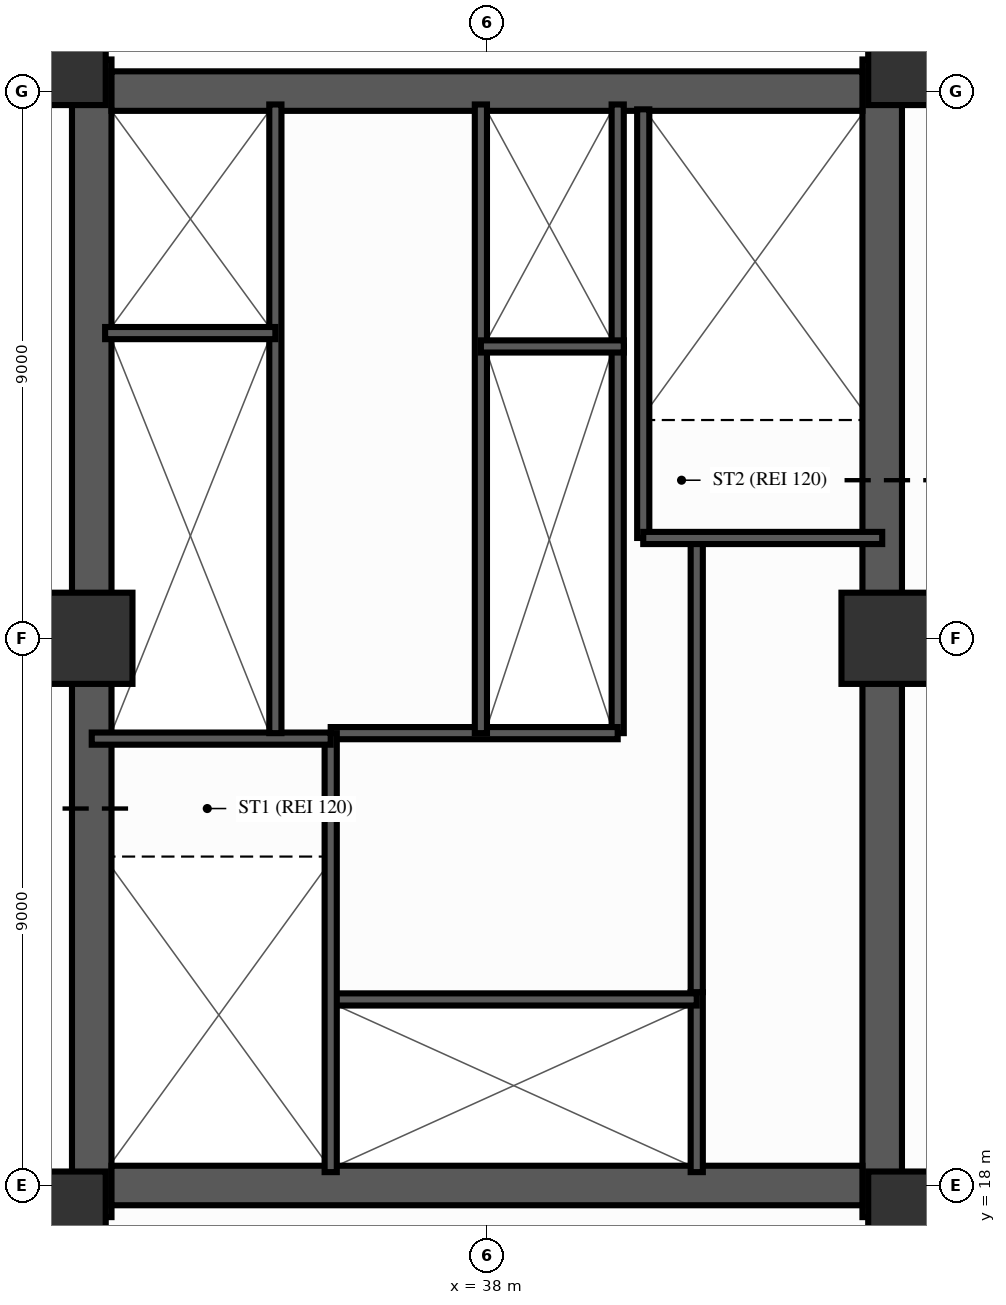
"""IFC4 building model, lengths in metres.
Left out: names, types, materials, properties, quantities, classifications, styles, units other than length and angle.
Written with IfcOpenShell. Run it as: python <this file> out.ifc"""

import sys

from ifc_helpers import new_model, si_unit, direction, frame, frame_2d, origin, origin_2d, place, context, subcontext, project, spatial, rectangle, extrude, source, transform, mapped, element, fill, save


model = new_model("IFC4")
c1 = context("Model", 3, precision=1e-05, world=origin(), true_north=direction((0.0, 1.0)))
c2 = subcontext(c1, "Body", "Model", "MODEL_VIEW")
j1 = project(units=[si_unit("LENGTHUNIT", "METRE"), si_unit("PLANEANGLEUNIT", "RADIAN")], contexts=[c1])
p1 = place(None, origin())
s1 = spatial("IfcSite", under=j1, at=p1, CompositionType="ELEMENT")
p2 = place(p1, origin())
s2 = spatial("IfcBuilding", under=s1, at=p2, CompositionType="ELEMENT")
p3 = place(p2, frame((0.0, 0.0, 19.4)))
s3 = spatial("IfcBuildingStorey", under=s2, at=p3, CompositionType="ELEMENT", Elevation=19.4)
p4 = place(p3, frame((31.5, 17.48, 0.0), z_axis=(0.0, 0.0, 1.0), x_axis=(0.0, 1.0, 0.0)))
e1 = element("IfcWall", 1, at=p4, inside=s3, PredefinedType="SHEAR", context=c2, shape_type="SweptSolid", body=[
    extrude(rectangle(XDim=19.04, YDim=0.65, at=frame_2d((9.52, 0.0))), origin(), (0.0, 0.0, 1.0), 3.0),
])
p5 = place(p4, frame((6.32, 0.0, 0.0)))
e2 = element("IfcOpeningElement", 2, at=p5, cuts=e1, PredefinedType="OPENING", context=c2, shape_type="SweptSolid", body=[
    extrude(rectangle(XDim=1.1, YDim=2.15, at=frame_2d((0.55, 1.075))), frame((0.0, 0.337, 0.0), z_axis=(0.0, -1.0, 0.0), x_axis=(1.0, 0.0, 0.0)), (0.0, 0.0, 1.0), 0.674),
])
p6 = place(p3, frame((44.5, 17.48, 0.0), z_axis=(0.0, 0.0, 1.0), x_axis=(0.0, 1.0, 0.0)))
e3 = element("IfcWall", 3, at=p6, inside=s3, PredefinedType="SHEAR", context=c2, shape_type="SweptSolid", body=[
    extrude(rectangle(XDim=19.04, YDim=0.65, at=frame_2d((9.52, 0.0))), origin(), (0.0, 0.0, 1.0), 3.0),
])
p7 = place(p6, frame((12.67, 0.0, 0.0), z_axis=(0.0, 0.0, 1.0), x_axis=(-1.0, 0.0, 0.0)))
e4 = element("IfcOpeningElement", 4, at=p7, cuts=e3, PredefinedType="OPENING", context=c2, shape_type="SweptSolid", body=[
    extrude(rectangle(XDim=1.1, YDim=2.15, at=frame_2d((0.55, 1.075))), frame((0.0, 0.337, 0.0), z_axis=(0.0, -1.0, 0.0), x_axis=(1.0, 0.0, 0.0)), (0.0, 0.0, 1.0), 0.674),
])
p8 = place(p3, frame((31.825, 18.0, 0.0), z_axis=(0.0, 0.0, 1.0), x_axis=(1.0, 0.0, 0.0)))
e5 = element("IfcWall", 5, at=p8, inside=s3, PredefinedType="SHEAR", context=c2, shape_type="SweptSolid", body=[
    extrude(rectangle(XDim=12.35, YDim=0.65, at=frame_2d((6.175, 0.0))), origin(), (0.0, 0.0, 1.0), 3.0),
])
p9 = place(p3, frame((31.825, 36.0, 0.0), z_axis=(0.0, 0.0, 1.0), x_axis=(1.0, 0.0, 0.0)))
e6 = element("IfcWall", 6, at=p9, inside=s3, PredefinedType="SHEAR", context=c2, shape_type="SweptSolid", body=[
    extrude(rectangle(XDim=12.35, YDim=0.65, at=frame_2d((6.175, 0.0))), origin(), (0.0, 0.0, 1.0), 3.0),
])
p10 = place(p9, frame((5.125, 0.0, 0.0), z_axis=(0.0, 0.0, 1.0), x_axis=(-1.0, 0.0, 0.0)))
e7 = element("IfcOpeningElement", 7, at=p10, cuts=e6, PredefinedType="OPENING", context=c2, shape_type="SweptSolid", body=[
    extrude(rectangle(XDim=1.4, YDim=2.15, at=frame_2d((0.7, 1.075))), frame((0.0, 0.337, 0.0), z_axis=(0.0, -1.0, 0.0), x_axis=(1.0, 0.0, 0.0)), (0.0, 0.0, 1.0), 0.674),
])
m1 = source(origin(), c2, "Body", "SweptSolid", [
    extrude(rectangle(XDim=1.5, YDim=1.5, at=origin_2d()), origin(), (0.0, 0.0, 1.0), 3.0),
])
for number, where, z_axis, x_axis in (
    (8, (30.98, 17.48, 0.0), (0.0, 0.0, 1.0), (1.0, 0.0, 0.0)),
    (9, (45.02, 17.48, 0.0), (0.0, 0.0, 1.0), (1.0, 0.0, 0.0)),
    (10, (30.98, 36.52, 0.0), (0.0, 0.0, 1.0), (1.0, 0.0, 0.0)),
    (11, (45.02, 36.52, 0.0), (0.0, 0.0, 1.0), (1.0, 0.0, 0.0)),
    (12, (31.42, 27.0, 0.0), (0.0, 0.0, 1.0), (1.0, 0.0, 0.0)),
    (13, (44.58, 27.0, 0.0), (0.0, 0.0, 1.0), (1.0, 0.0, 0.0)),
):
    element("IfcColumn", number, at=place(p3, frame(where, z_axis=z_axis, x_axis=x_axis)), inside=s3, PredefinedType="COLUMN", context=c2, shape_type="MappedRepresentation", body=[
        mapped(m1, transform((0.0, 0.0, 0.0), scale=1.0)),
    ])
p11 = place(p3, frame((41.45, 18.22, 0.0), z_axis=(0.0, 0.0, 1.0), x_axis=(0.0, 1.0, 0.0)))
e14 = element("IfcWall", 14, at=p11, inside=s3, PredefinedType="PARTITIONING", context=c2, shape_type="SweptSolid", body=[
    extrude(rectangle(XDim=2.96, YDim=0.2, at=frame_2d((1.48, 0.0))), origin(), (0.0, 0.0, 1.0), 2.79),
])
p12 = place(p3, frame((41.45, 21.18, 0.0), z_axis=(0.0, 0.0, 1.0), x_axis=(0.0, 1.0, 0.0)))
e15 = element("IfcWall", 15, at=p12, inside=s3, PredefinedType="PARTITIONING", context=c2, shape_type="SweptSolid", body=[
    extrude(rectangle(XDim=7.42, YDim=0.2, at=frame_2d((3.71, 0.0))), origin(), (0.0, 0.0, 1.0), 2.79),
])
p13 = place(p12, frame((2.6, 0.0, 0.0)))
e16 = element("IfcOpeningElement", 16, at=p13, cuts=e15, PredefinedType="OPENING", context=c2, shape_type="SweptSolid", body=[
    extrude(rectangle(XDim=0.9, YDim=2.1, at=frame_2d((0.45, 1.05))), frame((0.0, 0.112, 0.0), z_axis=(0.0, -1.0, 0.0), x_axis=(1.0, 0.0, 0.0)), (0.0, 0.0, 1.0), 0.224),
])
p14 = place(p3, frame((40.15, 25.44, 0.0), z_axis=(0.0, 0.0, 1.0), x_axis=(0.0, 1.0, 0.0)))
e17 = element("IfcWall", 17, at=p14, inside=s3, PredefinedType="PARTITIONING", context=c2, shape_type="SweptSolid", body=[
    extrude(rectangle(XDim=6.36, YDim=0.2, at=frame_2d((3.18, 0.0))), origin(), (0.0, 0.0, 1.0), 2.79),
])
p15 = place(p3, frame((40.15, 31.8, 0.0), z_axis=(0.0, 0.0, 1.0), x_axis=(0.0, 1.0, 0.0)))
e18 = element("IfcWall", 18, at=p15, inside=s3, PredefinedType="PARTITIONING", context=c2, shape_type="SweptSolid", body=[
    extrude(rectangle(XDim=3.98, YDim=0.2, at=frame_2d((1.99, 0.0))), origin(), (0.0, 0.0, 1.0), 2.79),
])
p16 = place(p3, frame((35.43, 21.06, 0.0), z_axis=(0.0, 0.0, 1.0), x_axis=(1.0, 0.0, 0.0)))
e19 = element("IfcWall", 19, at=p16, inside=s3, PredefinedType="PARTITIONING", context=c2, shape_type="SweptSolid", body=[
    extrude(rectangle(XDim=6.02, YDim=0.2, at=frame_2d((3.01, 0.0))), origin(), (0.0, 0.0, 1.0), 2.79),
])
p17 = place(p16, frame((1.0, 0.0, 0.0)))
e20 = element("IfcOpeningElement", 20, at=p17, cuts=e19, PredefinedType="OPENING", context=c2, shape_type="SweptSolid", body=[
    extrude(rectangle(XDim=1.1, YDim=2.15, at=frame_2d((0.55, 1.075))), frame((0.0, 0.112, 0.0), z_axis=(0.0, -1.0, 0.0), x_axis=(1.0, 0.0, 0.0)), (0.0, 0.0, 1.0), 0.224),
])
p18 = place(p16, frame((2.95, 0.0, 0.0)))
e21 = element("IfcOpeningElement", 21, at=p18, cuts=e19, PredefinedType="OPENING", context=c2, shape_type="SweptSolid", body=[
    extrude(rectangle(XDim=1.1, YDim=2.15, at=frame_2d((0.55, 1.075))), frame((0.0, 0.112, 0.0), z_axis=(0.0, -1.0, 0.0), x_axis=(1.0, 0.0, 0.0)), (0.0, 0.0, 1.0), 0.224),
])
p19 = place(p16, frame((4.58, 0.0, 0.0)))
e22 = element("IfcOpeningElement", 22, at=p19, cuts=e19, PredefinedType="OPENING", context=c2, shape_type="SweptSolid", body=[
    extrude(rectangle(XDim=1.2, YDim=2.15, at=frame_2d((0.6, 1.075))), frame((0.0, 0.112, 0.0), z_axis=(0.0, -1.0, 0.0), x_axis=(1.0, 0.0, 0.0)), (0.0, 0.0, 1.0), 0.224),
])
p20 = place(p3, frame((35.43, 25.44, 0.0), z_axis=(0.0, 0.0, 1.0), x_axis=(1.0, 0.0, 0.0)))
e23 = element("IfcWall", 23, at=p20, inside=s3, PredefinedType="PARTITIONING", context=c2, shape_type="SweptSolid", body=[
    extrude(rectangle(XDim=4.72, YDim=0.2, at=frame_2d((2.36, 0.0))), origin(), (0.0, 0.0, 1.0), 2.79),
])
p21 = place(p20, frame((1.25, 0.0, 0.0)))
e24 = element("IfcOpeningElement", 24, at=p21, cuts=e23, PredefinedType="OPENING", context=c2, shape_type="SweptSolid", body=[
    extrude(rectangle(XDim=1.1, YDim=2.15, at=frame_2d((0.55, 1.075))), frame((0.0, 0.112, 0.0), z_axis=(0.0, -1.0, 0.0), x_axis=(1.0, 0.0, 0.0)), (0.0, 0.0, 1.0), 0.224),
])
p22 = place(p3, frame((35.43, 18.22, 0.0), z_axis=(0.0, 0.0, 1.0), x_axis=(0.0, 1.0, 0.0)))
e25 = element("IfcWall", 25, at=p22, inside=s3, PredefinedType="SOLIDWALL", context=c2, shape_type="SweptSolid", body=[
    extrude(rectangle(XDim=7.22, YDim=0.2, at=frame_2d((3.61, 0.0))), origin(), (0.0, 0.0, 1.0), 2.79),
])
p23 = place(p22, frame((6.68, 0.0, 0.0), z_axis=(0.0, 0.0, 1.0), x_axis=(-1.0, 0.0, 0.0)))
e26 = element("IfcOpeningElement", 26, at=p23, cuts=e25, PredefinedType="OPENING", context=c2, shape_type="SweptSolid", body=[
    extrude(rectangle(XDim=1.1, YDim=2.15, at=frame_2d((0.55, 1.075))), frame((0.0, 0.112, 0.0), z_axis=(0.0, -1.0, 0.0), x_axis=(1.0, 0.0, 0.0)), (0.0, 0.0, 1.0), 0.224),
])
p24 = place(p3, frame((31.5, 25.35, 0.0), z_axis=(0.0, 0.0, 1.0), x_axis=(1.0, 0.0, 0.0)))
e27 = element("IfcWall", 27, at=p24, inside=s3, PredefinedType="SOLIDWALL", context=c2, shape_type="SweptSolid", body=[
    extrude(rectangle(XDim=3.93, YDim=0.2, at=frame_2d((1.965, 0.0))), origin(), (0.0, 0.0, 1.0), 2.79),
])
p25 = place(p3, frame((40.57, 28.65, 0.0), z_axis=(0.0, 0.0, 1.0), x_axis=(0.0, 1.0, 0.0)))
e28 = element("IfcWall", 28, at=p25, inside=s3, PredefinedType="SOLIDWALL", context=c2, shape_type="SweptSolid", body=[
    extrude(rectangle(XDim=7.05, YDim=0.2, at=frame_2d((3.525, 0.0))), origin(), (0.0, 0.0, 1.0), 2.79),
])
p26 = place(p3, frame((40.57, 28.65, 0.0), z_axis=(0.0, 0.0, 1.0), x_axis=(1.0, 0.0, 0.0)))
e29 = element("IfcWall", 29, at=p26, inside=s3, PredefinedType="SOLIDWALL", context=c2, shape_type="SweptSolid", body=[
    extrude(rectangle(XDim=3.93, YDim=0.2, at=frame_2d((1.965, 0.0))), origin(), (0.0, 0.0, 1.0), 2.79),
])
p27 = place(p3, frame((34.52, 25.44, 0.0), z_axis=(0.0, 0.0, 1.0), x_axis=(0.0, 1.0, 0.0)))
e30 = element("IfcWall", 30, at=p27, inside=s3, PredefinedType="PARTITIONING", context=c2, shape_type="SweptSolid", body=[
    extrude(rectangle(XDim=10.34, YDim=0.2, at=frame_2d((5.17, 0.0))), origin(), (0.0, 0.0, 1.0), 2.79),
])
p28 = place(p27, frame((0.32, 0.0, 0.0)))
e31 = element("IfcOpeningElement", 31, at=p28, cuts=e30, PredefinedType="OPENING", context=c2, shape_type="SweptSolid", body=[
    extrude(rectangle(XDim=1.0, YDim=2.15, at=frame_2d((0.5, 1.075))), frame((0.0, 0.112, 0.0), z_axis=(0.0, -1.0, 0.0), x_axis=(1.0, 0.0, 0.0)), (0.0, 0.0, 1.0), 0.224),
])
p29 = place(p27, frame((1.71, 0.0, 0.0)))
e32 = element("IfcOpeningElement", 32, at=p29, cuts=e30, PredefinedType="OPENING", context=c2, shape_type="SweptSolid", body=[
    extrude(rectangle(XDim=1.0, YDim=2.15, at=frame_2d((0.5, 1.075))), frame((0.0, 0.112, 0.0), z_axis=(0.0, -1.0, 0.0), x_axis=(1.0, 0.0, 0.0)), (0.0, 0.0, 1.0), 0.224),
])
p30 = place(p27, frame((3.535, 0.0, 0.0)))
e33 = element("IfcOpeningElement", 33, at=p30, cuts=e30, PredefinedType="OPENING", context=c2, shape_type="SweptSolid", body=[
    extrude(rectangle(XDim=1.0, YDim=2.15, at=frame_2d((0.5, 1.075))), frame((0.0, 0.112, 0.0), z_axis=(0.0, -1.0, 0.0), x_axis=(1.0, 0.0, 0.0)), (0.0, 0.0, 1.0), 0.224),
])
p31 = place(p27, frame((5.135, 0.0, 0.0)))
e34 = element("IfcOpeningElement", 34, at=p31, cuts=e30, PredefinedType="OPENING", context=c2, shape_type="SweptSolid", body=[
    extrude(rectangle(XDim=1.0, YDim=2.15, at=frame_2d((0.5, 1.075))), frame((0.0, 0.112, 0.0), z_axis=(0.0, -1.0, 0.0), x_axis=(1.0, 0.0, 0.0)), (0.0, 0.0, 1.0), 0.224),
])
p32 = place(p3, frame((31.72, 32.02, 0.0), z_axis=(0.0, 0.0, 1.0), x_axis=(1.0, 0.0, 0.0)))
e35 = element("IfcWall", 35, at=p32, inside=s3, PredefinedType="PARTITIONING", context=c2, shape_type="SweptSolid", body=[
    extrude(rectangle(XDim=2.8, YDim=0.2, at=frame_2d((1.4, 0.0))), origin(), (0.0, 0.0, 1.0), 2.79),
])
p33 = place(p3, frame((37.9, 25.44, 0.0), z_axis=(0.0, 0.0, 1.0), x_axis=(0.0, 1.0, 0.0)))
e36 = element("IfcWall", 36, at=p33, inside=s3, PredefinedType="PARTITIONING", context=c2, shape_type="SweptSolid", body=[
    extrude(rectangle(XDim=10.34, YDim=0.2, at=frame_2d((5.17, 0.0))), origin(), (0.0, 0.0, 1.0), 2.79),
])
p34 = place(p3, frame((37.9, 31.8, 0.0), z_axis=(0.0, 0.0, 1.0), x_axis=(1.0, 0.0, 0.0)))
e37 = element("IfcWall", 37, at=p34, inside=s3, PredefinedType="PARTITIONING", context=c2, shape_type="SweptSolid", body=[
    extrude(rectangle(XDim=2.35, YDim=0.2, at=frame_2d((1.175, 0.0))), origin(), (0.0, 0.0, 1.0), 2.79),
])
m2 = source(origin(), c2, "Body", "SweptSolid", [
    extrude(rectangle(XDim=1.1, YDim=2.15, at=frame_2d((0.55, 1.075))), frame((0.0, 0.025, 0.0), z_axis=(0.0, -1.0, 0.0), x_axis=(1.0, 0.0, 0.0)), (0.0, 0.0, 1.0), 0.05),
])
p35 = place(p5, origin())
e38 = element("IfcDoor", 38, at=p35, inside=s3, OperationType="SINGLE_SWING_LEFT", PredefinedType="DOOR", context=c2, shape_type="MappedRepresentation", body=[
    mapped(m2, transform((0.0, 0.0, 0.0), scale=1.0)),
])
fill(e2, e38)
p36 = place(p7, origin())
e39 = element("IfcDoor", 39, at=p36, inside=s3, OperationType="SINGLE_SWING_RIGHT", PredefinedType="DOOR", context=c2, shape_type="MappedRepresentation", body=[
    mapped(m2, transform((0.0, 0.0, 0.0), scale=1.0)),
])
fill(e4, e39)
m3 = source(origin(), c2, "Body", "SweptSolid", [
    extrude(rectangle(XDim=1.4, YDim=2.15, at=frame_2d((0.7, 1.075))), frame((0.0, 0.025, 0.0), z_axis=(0.0, -1.0, 0.0), x_axis=(1.0, 0.0, 0.0)), (0.0, 0.0, 1.0), 0.05),
])
p37 = place(p10, origin())
e40 = element("IfcDoor", 40, at=p37, inside=s3, OperationType="SINGLE_SWING_RIGHT", PredefinedType="DOOR", context=c2, shape_type="MappedRepresentation", body=[
    mapped(m3, transform((0.0, 0.0, 0.0), scale=1.0)),
])
fill(e7, e40)
m4 = source(origin(), c2, "Body", "SweptSolid", [
    extrude(rectangle(XDim=0.9, YDim=2.1, at=frame_2d((0.45, 1.05))), frame((0.0, 0.025, 0.0), z_axis=(0.0, -1.0, 0.0), x_axis=(1.0, 0.0, 0.0)), (0.0, 0.0, 1.0), 0.05),
])
p38 = place(p13, origin())
e41 = element("IfcDoor", 41, at=p38, inside=s3, OperationType="SINGLE_SWING_RIGHT", PredefinedType="DOOR", context=c2, shape_type="MappedRepresentation", body=[
    mapped(m4, transform((0.0, 0.0, 0.0), scale=1.0)),
])
fill(e16, e41)
p39 = place(p17, origin())
e42 = element("IfcDoor", 42, at=p39, inside=s3, OperationType="DOUBLE_DOOR_SLIDING", PredefinedType="DOOR", context=c2, shape_type="MappedRepresentation", body=[
    mapped(m2, transform((0.0, 0.0, 0.0), scale=1.0)),
])
fill(e20, e42)
p40 = place(p18, origin())
e43 = element("IfcDoor", 43, at=p40, inside=s3, OperationType="DOUBLE_DOOR_SLIDING", PredefinedType="DOOR", context=c2, shape_type="MappedRepresentation", body=[
    mapped(m2, transform((0.0, 0.0, 0.0), scale=1.0)),
])
fill(e21, e43)
m5 = source(origin(), c2, "Body", "SweptSolid", [
    extrude(rectangle(XDim=1.2, YDim=2.15, at=frame_2d((0.6, 1.075))), frame((0.0, 0.025, 0.0), z_axis=(0.0, -1.0, 0.0), x_axis=(1.0, 0.0, 0.0)), (0.0, 0.0, 1.0), 0.05),
])
p41 = place(p19, origin())
e44 = element("IfcDoor", 44, at=p41, inside=s3, OperationType="DOUBLE_DOOR_SLIDING", PredefinedType="DOOR", context=c2, shape_type="MappedRepresentation", body=[
    mapped(m5, transform((0.0, 0.0, 0.0), scale=1.0)),
])
fill(e22, e44)
p42 = place(p21, origin())
e45 = element("IfcDoor", 45, at=p42, inside=s3, OperationType="SINGLE_SWING_LEFT", PredefinedType="DOOR", context=c2, shape_type="MappedRepresentation", body=[
    mapped(m2, transform((0.0, 0.0, 0.0), scale=1.0)),
])
fill(e24, e45)
p43 = place(p23, origin())
e46 = element("IfcDoor", 46, at=p43, inside=s3, OperationType="SINGLE_SWING_RIGHT", PredefinedType="DOOR", context=c2, shape_type="MappedRepresentation", body=[
    mapped(m2, transform((0.0, 0.0, 0.0), scale=1.0)),
])
fill(e26, e46)
m6 = source(origin(), c2, "Body", "SweptSolid", [
    extrude(rectangle(XDim=1.0, YDim=2.15, at=frame_2d((0.5, 1.075))), frame((0.0, 0.025, 0.0), z_axis=(0.0, -1.0, 0.0), x_axis=(1.0, 0.0, 0.0)), (0.0, 0.0, 1.0), 0.05),
])
p44 = place(p28, origin())
e47 = element("IfcDoor", 47, at=p44, inside=s3, OperationType="DOUBLE_DOOR_SLIDING", PredefinedType="DOOR", context=c2, shape_type="MappedRepresentation", body=[
    mapped(m6, transform((0.0, 0.0, 0.0), scale=1.0)),
])
fill(e31, e47)
p45 = place(p29, origin())
e48 = element("IfcDoor", 48, at=p45, inside=s3, OperationType="DOUBLE_DOOR_SLIDING", PredefinedType="DOOR", context=c2, shape_type="MappedRepresentation", body=[
    mapped(m6, transform((0.0, 0.0, 0.0), scale=1.0)),
])
fill(e32, e48)
p46 = place(p30, origin())
e49 = element("IfcDoor", 49, at=p46, inside=s3, OperationType="DOUBLE_DOOR_SLIDING", PredefinedType="DOOR", context=c2, shape_type="MappedRepresentation", body=[
    mapped(m6, transform((0.0, 0.0, 0.0), scale=1.0)),
])
fill(e33, e49)
p47 = place(p31, origin())
e50 = element("IfcDoor", 50, at=p47, inside=s3, OperationType="DOUBLE_DOOR_SLIDING", PredefinedType="DOOR", context=c2, shape_type="MappedRepresentation", body=[
    mapped(m6, transform((0.0, 0.0, 0.0), scale=1.0)),
])
fill(e34, e50)
save(model, sys.argv[1])
